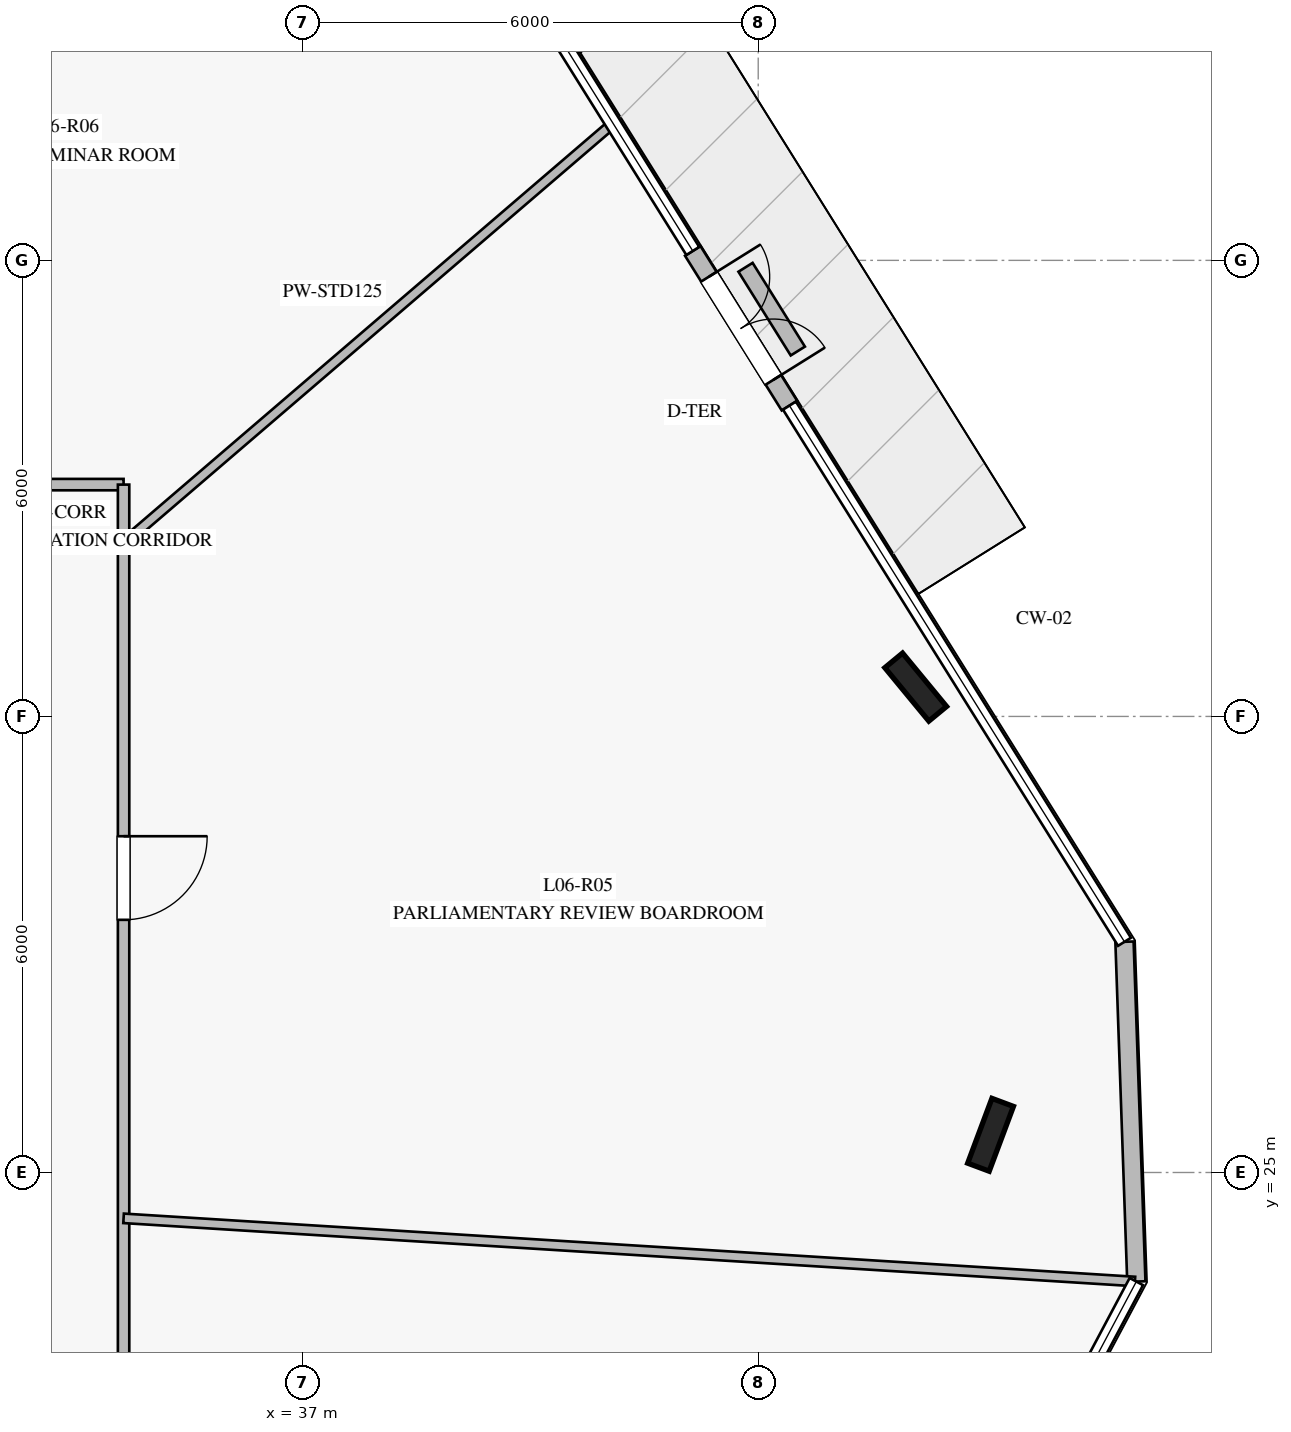
"""IFC4 building model, lengths in metres.
Left out: names, types, materials, properties, quantities, classifications, styles, units other than length and angle.
Written with IfcOpenShell. Run it as: python <this file> out.ifc"""

import sys

from ifc_helpers import new_model, si_unit, direction, frame, frame_2d, origin, origin_2d, place, context, subcontext, project, spatial, rectangle, i_section, extrude, element, fill, save


model = new_model("IFC4")
c1 = context("Model", 3, precision=1e-05, world=origin(), true_north=direction((0.0, 1.0)))
c2 = subcontext(c1, "Body", "Model", "MODEL_VIEW")
j1 = project(units=[si_unit("LENGTHUNIT", "METRE"), si_unit("PLANEANGLEUNIT", "RADIAN")], contexts=[c1])
p1 = place(None, origin())
s1 = spatial("IfcSite", under=j1, at=p1, CompositionType="ELEMENT")
p2 = place(p1, origin())
s2 = spatial("IfcBuilding", under=s1, at=p2, CompositionType="ELEMENT")
p3 = place(p2, frame((0.0, 0.0, 28.0)))
s3 = spatial("IfcBuildingStorey", under=s2, at=p3, CompositionType="ELEMENT", Elevation=28.0)
for number, where, z_axis, x_axis in (
    (1, (45.072, 31.386, 0.0), (0.0, 0.0, 1.0), (-0.636, 0.772, 0.0)),
    (2, (46.057, 25.496, 0.0), (0.0, 0.0, 1.0), (0.35, 0.937, 0.0)),
):
    element("IfcColumn", number, at=place(p3, frame(where, z_axis=z_axis, x_axis=x_axis)), inside=s3, PredefinedType="COLUMN", context=c2, shape_type="SweptSolid", body=[
        extrude(i_section(OverallWidth=0.302, OverallDepth=0.91, WebThickness=0.021, FlangeThickness=0.04, at=origin_2d()), origin(), (0.0, 0.0, 1.0), 4.0),
    ])
p4 = place(p3, frame((43.411, 35.089, 0.0), z_axis=(0.0, 0.0, 1.0), x_axis=(-0.530044663287, 0.847969725239, 0.0)))
e3 = element("IfcWall", 3, at=p4, inside=s3, PredefinedType="STANDARD", context=c2, shape_type="SweptSolid", body=[
    extrude(rectangle(XDim=2.4, YDim=0.24, at=frame_2d((1.2, 0.0))), origin(), (0.0, 0.0, 1.0), 3.76),
])
p5 = place(p4, frame((0.4, 0.0, 0.0)))
e4 = element("IfcOpeningElement", 4, at=p5, cuts=e3, PredefinedType="OPENING", context=c2, shape_type="SweptSolid", body=[
    extrude(rectangle(XDim=1.6, YDim=2.25, at=frame_2d((0.8, 1.125))), frame((0.0, 0.13, 0.0), z_axis=(0.0, -1.0, 0.0), x_axis=(1.0, 0.0, 0.0)), (0.0, 0.0, 1.0), 0.26),
])
p6 = place(p3, frame((47.975, 23.565, 0.0), z_axis=(0.0, 0.0, 1.0), x_axis=(-0.034879631963, 0.999391520513, 0.0)))
e5 = element("IfcWall", 5, at=p6, inside=s3, PredefinedType="STANDARD", context=c2, shape_type="SweptSolid", body=[
    extrude(rectangle(XDim=4.473, YDim=0.24, at=frame_2d((2.236, 0.0))), origin(), (0.0, 0.0, 1.0), 3.76),
])
p7 = place(p3, frame((43.521, 35.807, 0.0), z_axis=(0.0, 0.0, 1.0), x_axis=(-0.52955968417, 0.848272680747, 0.0)))
e6 = element("IfcWall", 6, at=p7, inside=s3, PredefinedType="USERDEFINED", context=c2, shape_type="SweptSolid", body=[
    extrude(rectangle(XDim=1.299, YDim=0.22, at=frame_2d((0.649, 0.0))), origin(), (0.0, 0.0, 1.0), 0.4),
])
p8 = place(p3, frame((15.35, 34.05, 0.0), z_axis=(0.0, 0.0, 1.0), x_axis=(1.0, 0.0, 0.0)))
e7 = element("IfcWall", 7, at=p8, inside=s3, PredefinedType="PARTITIONING", context=c2, shape_type="SweptSolid", body=[
    extrude(rectangle(XDim=19.3, YDim=0.15, at=frame_2d((9.65, 0.0))), origin(), (0.0, 0.0, 1.0), 3.21),
])
p9 = place(p8, frame((14.523, 0.0, 0.0)))
e8 = element("IfcOpeningElement", 8, at=p9, cuts=e7, PredefinedType="OPENING", context=c2, shape_type="SweptSolid", body=[
    extrude(rectangle(XDim=1.1, YDim=2.2, at=frame_2d((0.55, 1.1))), frame((0.0, 0.085, 0.0), z_axis=(0.0, -1.0, 0.0), x_axis=(1.0, 0.0, 0.0)), (0.0, 0.0, 1.0), 0.17),
])
p10 = place(p8, frame((5.327, 0.0, 0.0)))
e9 = element("IfcOpeningElement", 9, at=p10, cuts=e7, PredefinedType="OPENING", context=c2, shape_type="SweptSolid", body=[
    extrude(rectangle(XDim=1.1, YDim=2.2, at=frame_2d((0.55, 1.1))), frame((0.0, 0.085, 0.0), z_axis=(0.0, -1.0, 0.0), x_axis=(1.0, 0.0, 0.0)), (0.0, 0.0, 1.0), 0.17),
])
p11 = place(p3, frame((34.65, 34.05, 0.0), z_axis=(0.0, 0.0, 1.0), x_axis=(0.0, -1.0, 0.0)))
e10 = element("IfcWall", 10, at=p11, inside=s3, PredefinedType="PARTITIONING", context=c2, shape_type="SweptSolid", body=[
    extrude(rectangle(XDim=18.1, YDim=0.15, at=frame_2d((9.05, 0.0))), origin(), (0.0, 0.0, 1.0), 3.21),
])
p12 = place(p11, frame((13.006, 0.0, 0.0)))
e11 = element("IfcOpeningElement", 11, at=p12, cuts=e10, PredefinedType="OPENING", context=c2, shape_type="SweptSolid", body=[
    extrude(rectangle(XDim=1.1, YDim=2.2, at=frame_2d((0.55, 1.1))), frame((0.0, 0.085, 0.0), z_axis=(0.0, -1.0, 0.0), x_axis=(1.0, 0.0, 0.0)), (0.0, 0.0, 1.0), 0.17),
])
p13 = place(p11, frame((4.626, 0.0, 0.0)))
e12 = element("IfcOpeningElement", 12, at=p13, cuts=e10, PredefinedType="OPENING", context=c2, shape_type="SweptSolid", body=[
    extrude(rectangle(XDim=1.1, YDim=2.2, at=frame_2d((0.55, 1.1))), frame((0.0, 0.085, 0.0), z_axis=(0.0, -1.0, 0.0), x_axis=(1.0, 0.0, 0.0)), (0.0, 0.0, 1.0), 0.17),
])
p14 = place(p3, frame((34.65, 33.278, 0.0), z_axis=(0.0, 0.0, 1.0), x_axis=(0.758961436241, 0.651135575974, 0.0)))
e13 = element("IfcWall", 13, at=p14, inside=s3, PredefinedType="PARTITIONING", context=c2, shape_type="SweptSolid", body=[
    extrude(rectangle(XDim=8.468, YDim=0.125, at=frame_2d((4.234, 0.0))), origin(), (0.0, 0.0, 1.0), 3.05),
])
p15 = place(p3, frame((34.65, 24.397, 0.0), z_axis=(0.0, 0.0, 1.0), x_axis=(0.998055285193, -0.062334963686, 0.0)))
e14 = element("IfcWall", 14, at=p15, inside=s3, PredefinedType="PARTITIONING", context=c2, shape_type="SweptSolid", body=[
    extrude(rectangle(XDim=13.332, YDim=0.125, at=frame_2d((6.666, 0.0))), origin(), (0.0, 0.0, 1.0), 3.06),
])
p16 = place(p5, frame((1.6, 0.0, 0.0), z_axis=(0.0, 0.0, 1.0), x_axis=(-1.0, 0.0, 0.0)))
e15 = element("IfcDoor", 15, at=p16, inside=s3, OperationType="DOUBLE_DOOR_SINGLE_SWING", PredefinedType="DOOR", context=c2, shape_type="SweptSolid", body=[
    extrude(rectangle(XDim=1.6, YDim=2.25, at=frame_2d((0.8, 1.125))), frame((0.0, 0.025, 0.0), z_axis=(0.0, -1.0, 0.0), x_axis=(1.0, 0.0, 0.0)), (0.0, 0.0, 1.0), 0.05),
])
fill(e4, e15)
p17 = place(p13, origin())
e16 = element("IfcDoor", 16, at=p17, inside=s3, OperationType="SINGLE_SWING_LEFT", PredefinedType="DOOR", context=c2, shape_type="SweptSolid", body=[
    extrude(rectangle(XDim=1.1, YDim=2.2, at=frame_2d((0.55, 1.1))), frame((0.0, 0.025, 0.0), z_axis=(0.0, -1.0, 0.0), x_axis=(1.0, 0.0, 0.0)), (0.0, 0.0, 1.0), 0.05),
])
fill(e12, e16)
save(model, sys.argv[1])
